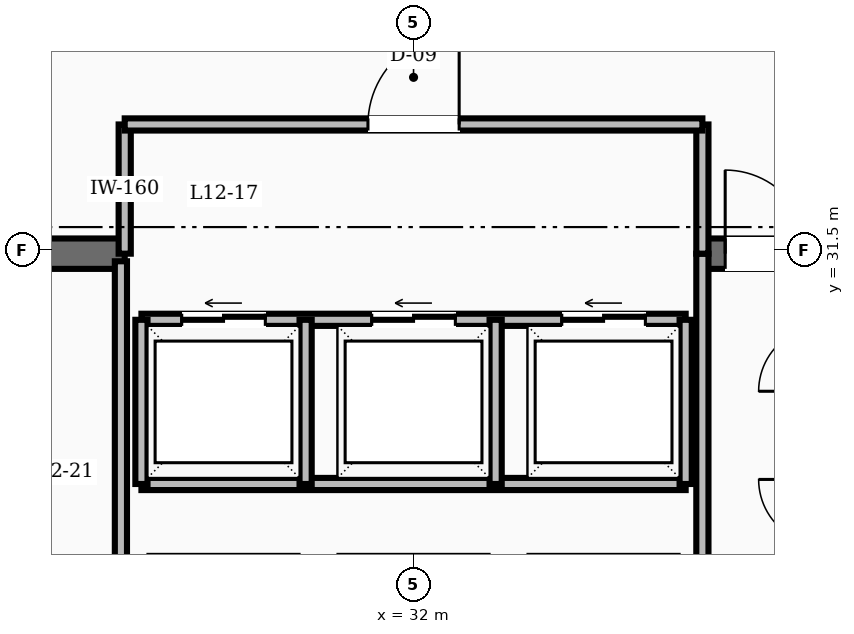
"""IFC4 building model, lengths in metres.
Left out: names, types, materials, properties, quantities, classifications, styles, units other than length and angle.
Written with IfcOpenShell. Run it as: python <this file> out.ifc"""

import sys

from ifc_helpers import new_model, si_unit, direction, frame, frame_2d, origin, place, context, subcontext, project, spatial, rectangle, extrude, element, fill, save


model = new_model("IFC4")
c1 = context("Model", 3, precision=1e-05, world=origin(), true_north=direction((0.0, 1.0)))
c2 = subcontext(c1, "Body", "Model", "MODEL_VIEW")
j1 = project(units=[si_unit("LENGTHUNIT", "METRE"), si_unit("PLANEANGLEUNIT", "RADIAN")], contexts=[c1])
p1 = place(None, origin())
s1 = spatial("IfcSite", under=j1, at=p1, CompositionType="ELEMENT")
p2 = place(p1, origin())
s2 = spatial("IfcBuilding", under=s1, at=p2, CompositionType="ELEMENT")
p3 = place(p2, frame((0.0, 0.0, 52.0)))
s3 = spatial("IfcBuildingStorey", under=s2, at=p3, CompositionType="ELEMENT", Elevation=52.0)
p4 = place(p3, frame((25.0, 31.45, 0.0), z_axis=(0.0, 0.0, 1.0), x_axis=(1.0, 0.0, 0.0)))
e1 = element("IfcWall", 1, at=p4, inside=s3, PredefinedType="SHEAR", context=c2, shape_type="SweptSolid", body=[
    extrude(rectangle(XDim=3.2, YDim=0.4, at=frame_2d((1.6, 0.0))), origin(), (0.0, 0.0, 1.0), 3.6),
])
p5 = place(p3, frame((35.8, 31.45, 0.0), z_axis=(0.0, 0.0, 1.0), x_axis=(1.0, 0.0, 0.0)))
e2 = element("IfcWall", 2, at=p5, inside=s3, PredefinedType="SHEAR", context=c2, shape_type="SweptSolid", body=[
    extrude(rectangle(XDim=3.2, YDim=0.4, at=frame_2d((1.6, 0.0))), origin(), (0.0, 0.0, 1.0), 3.6),
])
p6 = place(p5, frame((0.3, 0.0, 0.0)))
e3 = element("IfcOpeningElement", 3, at=p6, cuts=e2, PredefinedType="OPENING", context=c2, shape_type="SweptSolid", body=[
    extrude(rectangle(XDim=1.1, YDim=2.1, at=frame_2d((0.55, 1.05))), frame((0.0, 0.21, 0.0), z_axis=(0.0, -1.0, 0.0), x_axis=(1.0, 0.0, 0.0)), (0.0, 0.0, 1.0), 0.42),
])
p7 = place(p3, frame((35.8, 25.25, 0.0), z_axis=(0.0, 0.0, 1.0), x_axis=(0.0, 1.0, 0.0)))
e4 = element("IfcWall", 4, at=p7, inside=s3, PredefinedType="SOLIDWALL", context=c2, shape_type="SweptSolid", body=[
    extrude(rectangle(XDim=6.2, YDim=0.16, at=frame_2d((3.1, 0.0))), origin(), (0.0, 0.0, 1.0), 2.61),
])
p8 = place(p3, frame((28.42, 30.58, 0.0), z_axis=(0.0, 0.0, 1.0), x_axis=(1.0, 0.0, 0.0)))
e5 = element("IfcWall", 5, at=p8, inside=s3, PredefinedType="SOLIDWALL", context=c2, shape_type="SweptSolid", body=[
    extrude(rectangle(XDim=7.16, YDim=0.16, at=frame_2d((3.58, 0.0))), origin(), (0.0, 0.0, 1.0), 2.61),
])
p9 = place(p8, frame((0.53, 0.0, 0.0)))
e6 = element("IfcOpeningElement", 6, at=p9, cuts=e5, PredefinedType="OPENING", context=c2, shape_type="SweptSolid", body=[
    extrude(rectangle(XDim=1.1, YDim=2.15, at=frame_2d((0.55, 1.075))), frame((0.0, 0.09, 0.0), z_axis=(0.0, -1.0, 0.0), x_axis=(1.0, 0.0, 0.0)), (0.0, 0.0, 1.0), 0.18),
])
p10 = place(p8, frame((3.03, 0.0, 0.0)))
e7 = element("IfcOpeningElement", 7, at=p10, cuts=e5, PredefinedType="OPENING", context=c2, shape_type="SweptSolid", body=[
    extrude(rectangle(XDim=1.1, YDim=2.15, at=frame_2d((0.55, 1.075))), frame((0.0, 0.09, 0.0), z_axis=(0.0, -1.0, 0.0), x_axis=(1.0, 0.0, 0.0)), (0.0, 0.0, 1.0), 0.18),
])
p11 = place(p8, frame((5.53, 0.0, 0.0)))
e8 = element("IfcOpeningElement", 8, at=p11, cuts=e5, PredefinedType="OPENING", context=c2, shape_type="SweptSolid", body=[
    extrude(rectangle(XDim=1.1, YDim=2.15, at=frame_2d((0.55, 1.075))), frame((0.0, 0.09, 0.0), z_axis=(0.0, -1.0, 0.0), x_axis=(1.0, 0.0, 0.0)), (0.0, 0.0, 1.0), 0.18),
])
p12 = place(p3, frame((28.42, 28.42, 0.0), z_axis=(0.0, 0.0, 1.0), x_axis=(1.0, 0.0, 0.0)))
e9 = element("IfcWall", 9, at=p12, inside=s3, PredefinedType="SOLIDWALL", context=c2, shape_type="SweptSolid", body=[
    extrude(rectangle(XDim=7.16, YDim=0.16, at=frame_2d((3.58, 0.0))), origin(), (0.0, 0.0, 1.0), 2.61),
])
for number, where, z_axis, x_axis in (
    (10, (28.42, 28.42, 0.0), (0.0, 0.0, 1.0), (0.0, 1.0, 0.0)),
    (11, (30.58, 28.42, 0.0), (0.0, 0.0, 1.0), (0.0, 1.0, 0.0)),
    (12, (33.08, 28.42, 0.0), (0.0, 0.0, 1.0), (0.0, 1.0, 0.0)),
    (13, (35.58, 28.42, 0.0), (0.0, 0.0, 1.0), (0.0, 1.0, 0.0)),
):
    element("IfcWall", number, at=place(p3, frame(where, z_axis=z_axis, x_axis=x_axis)), inside=s3, PredefinedType="SOLIDWALL", context=c2, shape_type="SweptSolid", body=[
        extrude(rectangle(XDim=2.16, YDim=0.16, at=frame_2d((1.08, 0.0))), origin(), (0.0, 0.0, 1.0), 2.61),
    ])
for number, where, z_axis, x_axis in (
    (14, (28.2, 31.45, 0.0), (0.0, 0.0, 1.0), (0.0, 1.0, 0.0)),
    (15, (35.8, 31.45, 0.0), (0.0, 0.0, 1.0), (0.0, 1.0, 0.0)),
):
    element("IfcWall", number, at=place(p3, frame(where, z_axis=z_axis, x_axis=x_axis)), inside=s3, PredefinedType="SOLIDWALL", context=c2, shape_type="SweptSolid", body=[
        extrude(rectangle(XDim=1.7, YDim=0.16, at=frame_2d((0.85, 0.0))), origin(), (0.0, 0.0, 1.0), 2.61),
    ])
p13 = place(p3, frame((28.2, 33.15, 0.0), z_axis=(0.0, 0.0, 1.0), x_axis=(1.0, 0.0, 0.0)))
e16 = element("IfcWall", 16, at=p13, inside=s3, PredefinedType="SOLIDWALL", context=c2, shape_type="SweptSolid", body=[
    extrude(rectangle(XDim=7.6, YDim=0.16, at=frame_2d((3.8, 0.0))), origin(), (0.0, 0.0, 1.0), 2.61),
])
p14 = place(p13, frame((3.2, 0.0, 0.0)))
e17 = element("IfcOpeningElement", 17, at=p14, cuts=e16, PredefinedType="OPENING", context=c2, shape_type="SweptSolid", body=[
    extrude(rectangle(XDim=1.2, YDim=2.1, at=frame_2d((0.6, 1.05))), frame((0.0, 0.09, 0.0), z_axis=(0.0, -1.0, 0.0), x_axis=(1.0, 0.0, 0.0)), (0.0, 0.0, 1.0), 0.18),
])
p15 = place(p3, frame((28.15, 25.25, 0.0), z_axis=(0.0, 0.0, 1.0), x_axis=(0.0, 1.0, 0.0)))
e18 = element("IfcWall", 18, at=p15, inside=s3, PredefinedType="SOLIDWALL", context=c2, shape_type="SweptSolid", body=[
    extrude(rectangle(XDim=6.1, YDim=0.16, at=frame_2d((3.05, 0.0))), origin(), (0.0, 0.0, 1.0), 2.61),
])
p16 = place(p6, origin())
e19 = element("IfcDoor", 19, at=p16, inside=s3, OperationType="SINGLE_SWING_LEFT", PredefinedType="DOOR", context=c2, shape_type="SweptSolid", body=[
    extrude(rectangle(XDim=1.1, YDim=2.1, at=frame_2d((0.55, 1.05))), frame((0.0, 0.025, 0.0), z_axis=(0.0, -1.0, 0.0), x_axis=(1.0, 0.0, 0.0)), (0.0, 0.0, 1.0), 0.05),
])
fill(e3, e19)
p17 = place(p9, origin())
e20 = element("IfcDoor", 20, at=p17, inside=s3, OperationType="SLIDING_TO_LEFT", PredefinedType="DOOR", context=c2, shape_type="SweptSolid", body=[
    extrude(rectangle(XDim=1.1, YDim=2.15, at=frame_2d((0.55, 1.075))), frame((0.0, 0.025, 0.0), z_axis=(0.0, -1.0, 0.0), x_axis=(1.0, 0.0, 0.0)), (0.0, 0.0, 1.0), 0.05),
])
fill(e6, e20)
p18 = place(p10, origin())
e21 = element("IfcDoor", 21, at=p18, inside=s3, OperationType="SLIDING_TO_LEFT", PredefinedType="DOOR", context=c2, shape_type="SweptSolid", body=[
    extrude(rectangle(XDim=1.1, YDim=2.15, at=frame_2d((0.55, 1.075))), frame((0.0, 0.025, 0.0), z_axis=(0.0, -1.0, 0.0), x_axis=(1.0, 0.0, 0.0)), (0.0, 0.0, 1.0), 0.05),
])
fill(e7, e21)
p19 = place(p11, origin())
e22 = element("IfcDoor", 22, at=p19, inside=s3, OperationType="SLIDING_TO_LEFT", PredefinedType="DOOR", context=c2, shape_type="SweptSolid", body=[
    extrude(rectangle(XDim=1.1, YDim=2.15, at=frame_2d((0.55, 1.075))), frame((0.0, 0.025, 0.0), z_axis=(0.0, -1.0, 0.0), x_axis=(1.0, 0.0, 0.0)), (0.0, 0.0, 1.0), 0.05),
])
fill(e8, e22)
p20 = place(p14, origin())
e23 = element("IfcDoor", 23, at=p20, inside=s3, OperationType="SINGLE_SWING_RIGHT", PredefinedType="DOOR", context=c2, shape_type="SweptSolid", body=[
    extrude(rectangle(XDim=1.2, YDim=2.1, at=frame_2d((0.6, 1.05))), frame((0.0, 0.025, 0.0), z_axis=(0.0, -1.0, 0.0), x_axis=(1.0, 0.0, 0.0)), (0.0, 0.0, 1.0), 0.05),
])
fill(e17, e23)
save(model, sys.argv[1])
